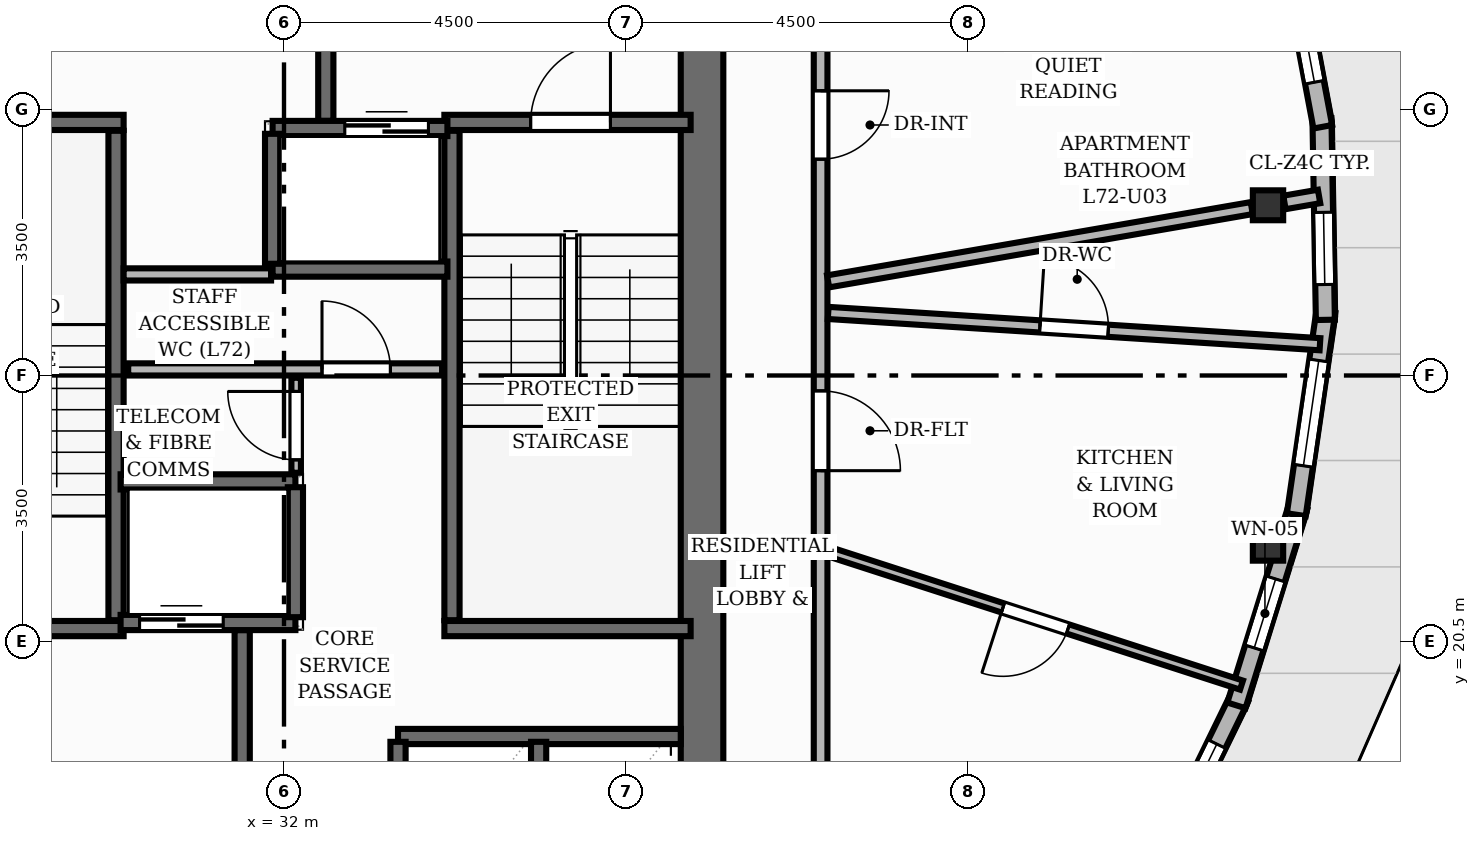
"""IFC4 building model, lengths in metres.
Left out: names, types, materials, properties, quantities, classifications, styles, units other than length and angle.
Written with IfcOpenShell. Run it as: python <this file> out.ifc"""

import sys

from ifc_helpers import new_model, si_unit, direction, frame, frame_2d, origin, origin_2d, place, context, subcontext, project, spatial, rectangle, i_section, extrude, element, fill, save


model = new_model("IFC4")
c1 = context("Model", 3, precision=1e-05, world=origin(), true_north=direction((0.0, 1.0)))
c2 = subcontext(c1, "Body", "Model", "MODEL_VIEW")
j1 = project(units=[si_unit("LENGTHUNIT", "METRE"), si_unit("PLANEANGLEUNIT", "RADIAN")], contexts=[c1])
p1 = place(None, origin())
s1 = spatial("IfcSite", under=j1, at=p1, CompositionType="ELEMENT")
p2 = place(p1, origin())
s2 = spatial("IfcBuilding", under=s1, at=p2, CompositionType="ELEMENT")
p3 = place(p2, frame((0.0, 0.0, 239.84)))
s3 = spatial("IfcBuildingStorey", under=s2, at=p3, CompositionType="ELEMENT", Elevation=239.84)
p4 = place(p3, frame((37.5, 17.28, 0.0), z_axis=(0.0, 0.0, 1.0), x_axis=(0.0, 1.0, 0.0)))
e1 = element("IfcWall", 1, at=p4, inside=s3, PredefinedType="SHEAR", context=c2, shape_type="SweptSolid", body=[
    extrude(rectangle(XDim=13.44, YDim=0.56, at=frame_2d((6.72, 0.0))), origin(), (0.0, 0.0, 1.0), 3.2),
])
for number, where, z_axis, x_axis in (
    (2, (44.946, 26.24, 0.0), (0.0, 0.0, 1.0), (1.0, 0.0, 0.0)),
    (3, (44.946, 21.76, 0.0), (0.0, 0.0, 1.0), (1.0, 0.0, 0.0)),
):
    element("IfcColumn", number, at=place(p3, frame(where, z_axis=z_axis, x_axis=x_axis)), inside=s3, PredefinedType="COLUMN", context=c2, shape_type="SweptSolid", body=[
        extrude(i_section(OverallWidth=0.399, OverallDepth=0.394, WebThickness=0.023, FlangeThickness=0.037, at=origin_2d()), origin(), (0.0, 0.0, 1.0), 3.2),
    ])
p5 = place(p3, frame((44.571, 19.761, 0.0), z_axis=(0.0, 0.0, 1.0), x_axis=(-0.438517804861, -0.898722501565, 0.0)))
e4 = element("IfcWall", 4, at=p5, inside=s3, PredefinedType="SOLIDWALL", context=c2, shape_type="SweptSolid", body=[
    extrude(rectangle(XDim=2.758, YDim=0.25, at=frame_2d((1.379, 0.0))), origin(), (0.0, 0.0, 1.0), 2.88),
])
p6 = place(p5, frame((0.679, 0.0, 0.85)))
e5 = element("IfcOpeningElement", 5, at=p6, cuts=e4, PredefinedType="OPENING", context=c2, shape_type="SweptSolid", body=[
    extrude(rectangle(XDim=1.4, YDim=1.55, at=frame_2d((0.7, 0.775))), frame((0.0, 0.135, 0.0), z_axis=(0.0, -1.0, 0.0), x_axis=(1.0, 0.0, 0.0)), (0.0, 0.0, 1.0), 0.27),
])
p7 = place(p3, frame((45.343, 22.275, 0.0), z_axis=(0.0, 0.0, 1.0), x_axis=(-0.29642164717, -0.955057174775, 0.0)))
e6 = element("IfcWall", 6, at=p7, inside=s3, PredefinedType="SOLIDWALL", context=c2, shape_type="SweptSolid", body=[
    extrude(rectangle(XDim=2.739, YDim=0.25, at=frame_2d((1.369, 0.0))), origin(), (0.0, 0.0, 1.0), 2.497),
])
p8 = place(p7, frame((0.997, 0.0, 0.85)))
e7 = element("IfcOpeningElement", 7, at=p8, cuts=e6, PredefinedType="OPENING", context=c2, shape_type="SweptSolid", body=[
    extrude(rectangle(XDim=0.95, YDim=1.45, at=frame_2d((0.475, 0.725))), frame((0.0, 0.135, 0.0), z_axis=(0.0, -1.0, 0.0), x_axis=(1.0, 0.0, 0.0)), (0.0, 0.0, 1.0), 0.27),
])
p9 = place(p3, frame((45.708, 24.842, 0.0), z_axis=(0.0, 0.0, 1.0), x_axis=(-0.144229466115, -0.989544269401, 0.0)))
e8 = element("IfcWall", 8, at=p9, inside=s3, PredefinedType="SOLIDWALL", context=c2, shape_type="SweptSolid", body=[
    extrude(rectangle(XDim=2.702, YDim=0.25, at=frame_2d((1.351, 0.0))), origin(), (0.0, 0.0, 1.0), 2.497),
])
p10 = place(p9, frame((0.651, 0.0, 0.85)))
e9 = element("IfcOpeningElement", 9, at=p10, cuts=e8, PredefinedType="OPENING", context=c2, shape_type="SweptSolid", body=[
    extrude(rectangle(XDim=1.4, YDim=1.55, at=frame_2d((0.7, 0.775))), frame((0.0, 0.135, 0.0), z_axis=(0.0, -1.0, 0.0), x_axis=(1.0, 0.0, 0.0)), (0.0, 0.0, 1.0), 0.27),
])
p11 = place(p3, frame((45.656, 27.383, 0.0), z_axis=(0.0, 0.0, 1.0), x_axis=(0.016945158089, -0.999856420501, 0.0)))
e10 = element("IfcWall", 10, at=p11, inside=s3, PredefinedType="SOLIDWALL", context=c2, shape_type="SweptSolid", body=[
    extrude(rectangle(XDim=2.651, YDim=0.25, at=frame_2d((1.326, 0.0))), origin(), (0.0, 0.0, 1.0), 2.88),
])
p12 = place(p11, frame((1.236, 0.0, 0.85)))
e11 = element("IfcOpeningElement", 11, at=p12, cuts=e10, PredefinedType="OPENING", context=c2, shape_type="SweptSolid", body=[
    extrude(rectangle(XDim=0.95, YDim=1.44, at=frame_2d((0.475, 0.72))), frame((0.0, 0.135, 0.0), z_axis=(0.0, -1.0, 0.0), x_axis=(1.0, 0.0, 0.0)), (0.0, 0.0, 1.0), 0.27),
])
p13 = place(p3, frame((45.188, 29.82, 0.0), z_axis=(0.0, 0.0, 1.0), x_axis=(0.184783228791, -0.982779302976, 0.0)))
e12 = element("IfcWall", 12, at=p13, inside=s3, PredefinedType="SOLIDWALL", context=c2, shape_type="SweptSolid", body=[
    extrude(rectangle(XDim=2.592, YDim=0.25, at=frame_2d((1.296, 0.0))), origin(), (0.0, 0.0, 1.0), 2.88),
])
p14 = place(p13, frame((0.596, 0.0, 0.85)))
e13 = element("IfcOpeningElement", 13, at=p14, cuts=e12, PredefinedType="OPENING", context=c2, shape_type="SweptSolid", body=[
    extrude(rectangle(XDim=1.4, YDim=1.55, at=frame_2d((0.7, 0.775))), frame((0.0, 0.135, 0.0), z_axis=(0.0, -1.0, 0.0), x_axis=(1.0, 0.0, 0.0)), (0.0, 0.0, 1.0), 0.27),
])
p15 = place(p3, frame((29.79, 20.78, 0.0), z_axis=(0.0, 0.0, 1.0), x_axis=(0.0, 1.0, 0.0)))
e14 = element("IfcWall", 14, at=p15, inside=s3, PredefinedType="SHEAR", context=c2, shape_type="SweptSolid", body=[
    extrude(rectangle(XDim=6.44, YDim=0.2, at=frame_2d((3.22, 0.0))), origin(), (0.0, 0.0, 1.0), 3.2),
])
p16 = place(p3, frame((26.65, 27.33, 0.0), z_axis=(0.0, 0.0, 1.0), x_axis=(1.0, 0.0, 0.0)))
e15 = element("IfcWall", 15, at=p16, inside=s3, PredefinedType="SHEAR", context=c2, shape_type="SweptSolid", body=[
    extrude(rectangle(XDim=3.24, YDim=0.2, at=frame_2d((1.62, 0.0))), origin(), (0.0, 0.0, 1.0), 3.2),
])
p17 = place(p3, frame((26.65, 20.67, 0.0), z_axis=(0.0, 0.0, 1.0), x_axis=(1.0, 0.0, 0.0)))
e16 = element("IfcWall", 16, at=p17, inside=s3, PredefinedType="SHEAR", context=c2, shape_type="SweptSolid", body=[
    extrude(rectangle(XDim=3.24, YDim=0.2, at=frame_2d((1.62, 0.0))), origin(), (0.0, 0.0, 1.0), 3.2),
])
p18 = place(p17, frame((1.055, 0.0, 0.0)))
e17 = element("IfcOpeningElement", 17, at=p18, cuts=e16, PredefinedType="OPENING", context=c2, shape_type="SweptSolid", body=[
    extrude(rectangle(XDim=1.05, YDim=2.15, at=frame_2d((0.525, 1.075))), frame((0.0, 0.11, 0.0), z_axis=(0.0, -1.0, 0.0), x_axis=(1.0, 0.0, 0.0)), (0.0, 0.0, 1.0), 0.22),
])
p19 = place(p3, frame((34.21, 20.78, 0.0), z_axis=(0.0, 0.0, 1.0), x_axis=(0.0, 1.0, 0.0)))
e18 = element("IfcWall", 18, at=p19, inside=s3, PredefinedType="SHEAR", context=c2, shape_type="SweptSolid", body=[
    extrude(rectangle(XDim=6.44, YDim=0.2, at=frame_2d((3.22, 0.0))), origin(), (0.0, 0.0, 1.0), 3.2),
])
p20 = place(p3, frame((34.11, 20.67, 0.0), z_axis=(0.0, 0.0, 1.0), x_axis=(1.0, 0.0, 0.0)))
e19 = element("IfcWall", 19, at=p20, inside=s3, PredefinedType="SHEAR", context=c2, shape_type="SweptSolid", body=[
    extrude(rectangle(XDim=3.24, YDim=0.2, at=frame_2d((1.62, 0.0))), origin(), (0.0, 0.0, 1.0), 3.2),
])
p21 = place(p3, frame((34.11, 27.33, 0.0), z_axis=(0.0, 0.0, 1.0), x_axis=(1.0, 0.0, 0.0)))
e20 = element("IfcWall", 20, at=p21, inside=s3, PredefinedType="SHEAR", context=c2, shape_type="SweptSolid", body=[
    extrude(rectangle(XDim=3.24, YDim=0.2, at=frame_2d((1.62, 0.0))), origin(), (0.0, 0.0, 1.0), 3.2),
])
p22 = place(p21, frame((1.135, 0.0, 0.0)))
e21 = element("IfcOpeningElement", 21, at=p22, cuts=e20, PredefinedType="OPENING", context=c2, shape_type="SweptSolid", body=[
    extrude(rectangle(XDim=1.05, YDim=2.15, at=frame_2d((0.525, 1.075))), frame((0.0, 0.11, 0.0), z_axis=(0.0, -1.0, 0.0), x_axis=(1.0, 0.0, 0.0)), (0.0, 0.0, 1.0), 0.22),
])
for number, where, z_axis, x_axis in (
    (22, (31.45, 17.15, 0.0), (0.0, 0.0, 1.0), (0.0, 1.0, 0.0)),
    (23, (32.55, 27.35, 0.0), (0.0, 0.0, 1.0), (0.0, 1.0, 0.0)),
):
    element("IfcWall", number, at=place(p3, frame(where, z_axis=z_axis, x_axis=x_axis)), inside=s3, PredefinedType="SHEAR", context=c2, shape_type="SweptSolid", body=[
        extrude(rectangle(XDim=3.5, YDim=0.2, at=frame_2d((1.75, 0.0))), origin(), (0.0, 0.0, 1.0), 3.2),
    ])
p23 = place(p3, frame((29.85, 20.75, 0.0), z_axis=(0.0, 0.0, 1.0), x_axis=(1.0, 0.0, 0.0)))
e24 = element("IfcWall", 24, at=p23, inside=s3, PredefinedType="SHEAR", context=c2, shape_type="SweptSolid", body=[
    extrude(rectangle(XDim=2.3, YDim=0.2, at=frame_2d((1.15, 0.0))), origin(), (0.0, 0.0, 1.0), 3.2),
])
p24 = place(p23, frame((0.25, 0.0, 0.0)))
e25 = element("IfcOpeningElement", 25, at=p24, cuts=e24, PredefinedType="OPENING", context=c2, shape_type="SweptSolid", body=[
    extrude(rectangle(XDim=1.1, YDim=2.15, at=frame_2d((0.55, 1.075))), frame((0.0, 0.11, 0.0), z_axis=(0.0, -1.0, 0.0), x_axis=(1.0, 0.0, 0.0)), (0.0, 0.0, 1.0), 0.22),
])
p25 = place(p3, frame((29.85, 22.6, 0.0), z_axis=(0.0, 0.0, 1.0), x_axis=(1.0, 0.0, 0.0)))
e26 = element("IfcWall", 26, at=p25, inside=s3, PredefinedType="SHEAR", context=c2, shape_type="SweptSolid", body=[
    extrude(rectangle(XDim=2.3, YDim=0.2, at=frame_2d((1.15, 0.0))), origin(), (0.0, 0.0, 1.0), 3.2),
])
p26 = place(p3, frame((32.15, 20.82, 0.0), z_axis=(0.0, 0.0, 1.0), x_axis=(0.0, 1.0, 0.0)))
e27 = element("IfcWall", 27, at=p26, inside=s3, PredefinedType="SHEAR", context=c2, shape_type="SweptSolid", body=[
    extrude(rectangle(XDim=1.71, YDim=0.2, at=frame_2d((0.855, 0.0))), origin(), (0.0, 0.0, 1.0), 3.2),
])
p27 = place(p3, frame((31.85, 27.25, 0.0), z_axis=(0.0, 0.0, 1.0), x_axis=(1.0, 0.0, 0.0)))
e28 = element("IfcWall", 28, at=p27, inside=s3, PredefinedType="SHEAR", context=c2, shape_type="SweptSolid", body=[
    extrude(rectangle(XDim=2.3, YDim=0.2, at=frame_2d((1.15, 0.0))), origin(), (0.0, 0.0, 1.0), 3.2),
])
p28 = place(p27, frame((0.95, 0.0, 0.0)))
e29 = element("IfcOpeningElement", 29, at=p28, cuts=e28, PredefinedType="OPENING", context=c2, shape_type="SweptSolid", body=[
    extrude(rectangle(XDim=1.1, YDim=2.15, at=frame_2d((0.55, 1.075))), frame((0.0, 0.11, 0.0), z_axis=(0.0, -1.0, 0.0), x_axis=(1.0, 0.0, 0.0)), (0.0, 0.0, 1.0), 0.22),
])
p29 = place(p3, frame((31.85, 25.4, 0.0), z_axis=(0.0, 0.0, 1.0), x_axis=(1.0, 0.0, 0.0)))
e30 = element("IfcWall", 30, at=p29, inside=s3, PredefinedType="SHEAR", context=c2, shape_type="SweptSolid", body=[
    extrude(rectangle(XDim=2.3, YDim=0.2, at=frame_2d((1.15, 0.0))), origin(), (0.0, 0.0, 1.0), 3.2),
])
p30 = place(p3, frame((31.85, 25.47, 0.0), z_axis=(0.0, 0.0, 1.0), x_axis=(0.0, 1.0, 0.0)))
e31 = element("IfcWall", 31, at=p30, inside=s3, PredefinedType="SHEAR", context=c2, shape_type="SweptSolid", body=[
    extrude(rectangle(XDim=1.71, YDim=0.2, at=frame_2d((0.855, 0.0))), origin(), (0.0, 0.0, 1.0), 3.2),
])
p31 = place(p3, frame((33.5, 19.25, 0.0), z_axis=(0.0, 0.0, 1.0), x_axis=(1.0, 0.0, 0.0)))
e32 = element("IfcWall", 32, at=p31, inside=s3, PredefinedType="SHEAR", context=c2, shape_type="SweptSolid", body=[
    extrude(rectangle(XDim=3.72, YDim=0.2, at=frame_2d((1.86, 0.0))), origin(), (0.0, 0.0, 1.0), 3.2),
])
for number, where, z_axis, x_axis in (
    (33, (33.5, 17.32, 0.0), (0.0, 0.0, 1.0), (0.0, 1.0, 0.0)),
    (34, (35.35, 17.32, 0.0), (0.0, 0.0, 1.0), (0.0, 1.0, 0.0)),
):
    element("IfcWall", number, at=place(p3, frame(where, z_axis=z_axis, x_axis=x_axis)), inside=s3, PredefinedType="SHEAR", context=c2, shape_type="SweptSolid", body=[
        extrude(rectangle(XDim=1.86, YDim=0.2, at=frame_2d((0.93, 0.0))), origin(), (0.0, 0.0, 1.0), 3.2),
    ])
p32 = place(p3, frame((29.95, 24.08, 0.0), z_axis=(0.0, 0.0, 1.0), x_axis=(1.0, 0.0, 0.0)))
e35 = element("IfcWall", 35, at=p32, inside=s3, PredefinedType="PLUMBINGWALL", context=c2, shape_type="SweptSolid", body=[
    extrude(rectangle(XDim=4.13, YDim=0.16, at=frame_2d((2.065, 0.0))), origin(), (0.0, 0.0, 1.0), 2.875),
])
p33 = place(p32, frame((2.55, 0.0, 0.0)))
e36 = element("IfcOpeningElement", 36, at=p33, cuts=e35, PredefinedType="OPENING", context=c2, shape_type="SweptSolid", body=[
    extrude(rectangle(XDim=0.9, YDim=2.1, at=frame_2d((0.45, 1.05))), frame((0.0, 0.09, 0.0), z_axis=(0.0, -1.0, 0.0), x_axis=(1.0, 0.0, 0.0)), (0.0, 0.0, 1.0), 0.18),
])
p34 = place(p3, frame((32.16, 22.72, 0.0), z_axis=(0.0, 0.0, 1.0), x_axis=(0.0, 1.0, 0.0)))
e37 = element("IfcWall", 37, at=p34, inside=s3, PredefinedType="PARTITIONING", context=c2, shape_type="SweptSolid", body=[
    extrude(rectangle(XDim=1.25, YDim=0.125, at=frame_2d((0.625, 0.0))), origin(), (0.0, 0.0, 1.0), 2.875),
])
p35 = place(p34, frame((0.17, 0.0, 0.0)))
e38 = element("IfcOpeningElement", 38, at=p35, cuts=e37, PredefinedType="OPENING", context=c2, shape_type="SweptSolid", body=[
    extrude(rectangle(XDim=0.9, YDim=2.1, at=frame_2d((0.45, 1.05))), frame((0.0, 0.073, 0.0), z_axis=(0.0, -1.0, 0.0), x_axis=(1.0, 0.0, 0.0)), (0.0, 0.0, 1.0), 0.145),
])
p36 = place(p3, frame((29.89, 25.33, 0.0), z_axis=(0.0, 0.0, 1.0), x_axis=(1.0, 0.0, 0.0)))
e39 = element("IfcWall", 39, at=p36, inside=s3, PredefinedType="PLUMBINGWALL", context=c2, shape_type="SweptSolid", body=[
    extrude(rectangle(XDim=1.94, YDim=0.16, at=frame_2d((0.97, 0.0))), origin(), (0.0, 0.0, 1.0), 2.875),
])
p37 = place(p3, frame((45.163, 26.277, 0.0), z_axis=(0.0, 0.0, 1.0), x_axis=(0.985450971837, 0.169959942652, 0.0)))
e40 = element("IfcWall", 40, at=p37, inside=s3, PredefinedType="PARTITIONING", context=c2, shape_type="SweptSolid", body=[
    extrude(rectangle(XDim=0.463, YDim=0.18, at=frame_2d((0.231, 0.0))), origin(), (0.0, 0.0, 1.0), 2.323),
])
p38 = place(p3, frame((39.06, 29.391, 0.0), z_axis=(0.0, 0.0, 1.0), x_axis=(0.0, -1.0, 0.0)))
e41 = element("IfcWall", 41, at=p38, inside=s3, PredefinedType="PARTITIONING", context=c2, shape_type="SweptSolid", body=[
    extrude(rectangle(XDim=13.951, YDim=0.18, at=frame_2d((6.975, 0.0))), origin(), (0.0, 0.0, 1.0), 2.875),
])
p39 = place(p38, frame((5.593, 0.0, 0.0)))
e42 = element("IfcOpeningElement", 42, at=p39, cuts=e41, PredefinedType="OPENING", context=c2, shape_type="SweptSolid", body=[
    extrude(rectangle(XDim=1.05, YDim=2.15, at=frame_2d((0.525, 1.075))), frame((0.0, 0.1, 0.0), z_axis=(0.0, -1.0, 0.0), x_axis=(1.0, 0.0, 0.0)), (0.0, 0.0, 1.0), 0.2),
])
p40 = place(p38, frame((1.645, 0.0, 0.0)))
e43 = element("IfcOpeningElement", 43, at=p40, cuts=e41, PredefinedType="OPENING", context=c2, shape_type="SweptSolid", body=[
    extrude(rectangle(XDim=0.9, YDim=2.1, at=frame_2d((0.45, 1.05))), frame((0.0, 0.1, 0.0), z_axis=(0.0, -1.0, 0.0), x_axis=(1.0, 0.0, 0.0)), (0.0, 0.0, 1.0), 0.2),
])
p41 = place(p3, frame((39.16, 24.823, 0.0), z_axis=(0.0, 0.0, 1.0), x_axis=(0.997982507088, -0.063489491621, 0.0)))
e44 = element("IfcWall", 44, at=p41, inside=s3, PredefinedType="PLUMBINGWALL", context=c2, shape_type="SweptSolid", body=[
    extrude(rectangle(XDim=6.483, YDim=0.16, at=frame_2d((3.242, 0.0))), origin(), (0.0, 0.0, 1.0), 2.612),
])
p42 = place(p41, frame((2.792, 0.0, 0.0)))
e45 = element("IfcOpeningElement", 45, at=p42, cuts=e44, PredefinedType="OPENING", context=c2, shape_type="SweptSolid", body=[
    extrude(rectangle(XDim=0.9, YDim=2.1, at=frame_2d((0.45, 1.05))), frame((0.0, 0.09, 0.0), z_axis=(0.0, -1.0, 0.0), x_axis=(1.0, 0.0, 0.0)), (0.0, 0.0, 1.0), 0.18),
])
p43 = place(p3, frame((44.598, 19.926, 0.0), z_axis=(0.0, 0.0, 1.0), x_axis=(-0.951480669713, 0.307708523058, 0.0)))
e46 = element("IfcWall", 46, at=p43, inside=s3, PredefinedType="PARTITIONING", context=c2, shape_type="SweptSolid", body=[
    extrude(rectangle(XDim=5.7, YDim=0.125, at=frame_2d((2.85, 0.0))), origin(), (0.0, 0.0, 1.0), 2.612),
])
p44 = place(p43, frame((2.4, 0.0, 0.0)))
e47 = element("IfcOpeningElement", 47, at=p44, cuts=e46, PredefinedType="OPENING", context=c2, shape_type="SweptSolid", body=[
    extrude(rectangle(XDim=0.9, YDim=2.1, at=frame_2d((0.45, 1.05))), frame((0.0, 0.073, 0.0), z_axis=(0.0, -1.0, 0.0), x_axis=(1.0, 0.0, 0.0)), (0.0, 0.0, 1.0), 0.145),
])
p45 = place(p3, frame((39.158, 25.238, 0.0), z_axis=(0.0, 0.0, 1.0), x_axis=(0.985360267717, 0.170485022229, 0.0)))
e48 = element("IfcWall", 48, at=p45, inside=s3, PredefinedType="PLUMBINGWALL", context=c2, shape_type="SweptSolid", body=[
    extrude(rectangle(XDim=5.656, YDim=0.16, at=frame_2d((2.828, 0.0))), origin(), (0.0, 0.0, 1.0), 2.323),
])
p46 = place(p6, origin())
e49 = element("IfcWindow", 49, at=p46, inside=s3, PartitioningType="SINGLE_PANEL", PredefinedType="WINDOW", context=c2, shape_type="SweptSolid", body=[
    extrude(rectangle(XDim=1.4, YDim=1.55, at=frame_2d((0.7, 0.775))), frame((0.0, 0.03, 0.0), z_axis=(0.0, -1.0, 0.0), x_axis=(1.0, 0.0, 0.0)), (0.0, 0.0, 1.0), 0.06),
])
fill(e5, e49)
p47 = place(p8, origin())
e50 = element("IfcWindow", 50, at=p47, inside=s3, PartitioningType="SINGLE_PANEL", PredefinedType="WINDOW", context=c2, shape_type="SweptSolid", body=[
    extrude(rectangle(XDim=0.95, YDim=1.45, at=frame_2d((0.475, 0.725))), frame((0.0, 0.03, 0.0), z_axis=(0.0, -1.0, 0.0), x_axis=(1.0, 0.0, 0.0)), (0.0, 0.0, 1.0), 0.06),
])
fill(e7, e50)
p48 = place(p10, origin())
e51 = element("IfcWindow", 51, at=p48, inside=s3, PartitioningType="SINGLE_PANEL", PredefinedType="WINDOW", context=c2, shape_type="SweptSolid", body=[
    extrude(rectangle(XDim=1.4, YDim=1.55, at=frame_2d((0.7, 0.775))), frame((0.0, 0.03, 0.0), z_axis=(0.0, -1.0, 0.0), x_axis=(1.0, 0.0, 0.0)), (0.0, 0.0, 1.0), 0.06),
])
fill(e9, e51)
p49 = place(p12, origin())
e52 = element("IfcWindow", 52, at=p49, inside=s3, PartitioningType="SINGLE_PANEL", PredefinedType="WINDOW", context=c2, shape_type="SweptSolid", body=[
    extrude(rectangle(XDim=0.95, YDim=1.44, at=frame_2d((0.475, 0.72))), frame((0.0, 0.03, 0.0), z_axis=(0.0, -1.0, 0.0), x_axis=(1.0, 0.0, 0.0)), (0.0, 0.0, 1.0), 0.06),
])
fill(e11, e52)
p50 = place(p14, origin())
e53 = element("IfcWindow", 53, at=p50, inside=s3, PartitioningType="SINGLE_PANEL", PredefinedType="WINDOW", context=c2, shape_type="SweptSolid", body=[
    extrude(rectangle(XDim=1.4, YDim=1.55, at=frame_2d((0.7, 0.775))), frame((0.0, 0.03, 0.0), z_axis=(0.0, -1.0, 0.0), x_axis=(1.0, 0.0, 0.0)), (0.0, 0.0, 1.0), 0.06),
])
fill(e13, e53)
p51 = place(p22, origin())
e54 = element("IfcDoor", 54, at=p51, inside=s3, OperationType="SINGLE_SWING_RIGHT", PredefinedType="DOOR", context=c2, shape_type="SweptSolid", body=[
    extrude(rectangle(XDim=1.05, YDim=2.15, at=frame_2d((0.525, 1.075))), frame((0.0, 0.025, 0.0), z_axis=(0.0, -1.0, 0.0), x_axis=(1.0, 0.0, 0.0)), (0.0, 0.0, 1.0), 0.05),
])
fill(e21, e54)
p52 = place(p24, origin())
e55 = element("IfcDoor", 55, at=p52, inside=s3, OperationType="DOUBLE_DOOR_SLIDING", PredefinedType="DOOR", context=c2, shape_type="SweptSolid", body=[
    extrude(rectangle(XDim=1.1, YDim=2.15, at=frame_2d((0.55, 1.075))), frame((0.0, 0.025, 0.0), z_axis=(0.0, -1.0, 0.0), x_axis=(1.0, 0.0, 0.0)), (0.0, 0.0, 1.0), 0.05),
])
fill(e25, e55)
p53 = place(p28, origin())
e56 = element("IfcDoor", 56, at=p53, inside=s3, OperationType="DOUBLE_DOOR_SLIDING", PredefinedType="DOOR", context=c2, shape_type="SweptSolid", body=[
    extrude(rectangle(XDim=1.1, YDim=2.15, at=frame_2d((0.55, 1.075))), frame((0.0, 0.025, 0.0), z_axis=(0.0, -1.0, 0.0), x_axis=(1.0, 0.0, 0.0)), (0.0, 0.0, 1.0), 0.05),
])
fill(e29, e56)
p54 = place(p33, origin())
e57 = element("IfcDoor", 57, at=p54, inside=s3, OperationType="SINGLE_SWING_LEFT", PredefinedType="DOOR", context=c2, shape_type="SweptSolid", body=[
    extrude(rectangle(XDim=0.9, YDim=2.1, at=frame_2d((0.45, 1.05))), frame((0.0, 0.025, 0.0), z_axis=(0.0, -1.0, 0.0), x_axis=(1.0, 0.0, 0.0)), (0.0, 0.0, 1.0), 0.05),
])
fill(e36, e57)
p55 = place(p35, origin())
e58 = element("IfcDoor", 58, at=p55, inside=s3, OperationType="SINGLE_SWING_RIGHT", PredefinedType="DOOR", context=c2, shape_type="SweptSolid", body=[
    extrude(rectangle(XDim=0.9, YDim=2.1, at=frame_2d((0.45, 1.05))), frame((0.0, 0.025, 0.0), z_axis=(0.0, -1.0, 0.0), x_axis=(1.0, 0.0, 0.0)), (0.0, 0.0, 1.0), 0.05),
])
fill(e38, e58)
p56 = place(p39, origin())
e59 = element("IfcDoor", 59, at=p56, inside=s3, OperationType="SINGLE_SWING_RIGHT", PredefinedType="DOOR", context=c2, shape_type="SweptSolid", body=[
    extrude(rectangle(XDim=1.05, YDim=2.15, at=frame_2d((0.525, 1.075))), frame((0.0, 0.025, 0.0), z_axis=(0.0, -1.0, 0.0), x_axis=(1.0, 0.0, 0.0)), (0.0, 0.0, 1.0), 0.05),
])
fill(e42, e59)
p57 = place(p42, origin())
e60 = element("IfcDoor", 60, at=p57, inside=s3, OperationType="SINGLE_SWING_LEFT", PredefinedType="DOOR", context=c2, shape_type="SweptSolid", body=[
    extrude(rectangle(XDim=0.9, YDim=2.1, at=frame_2d((0.45, 1.05))), frame((0.0, 0.025, 0.0), z_axis=(0.0, -1.0, 0.0), x_axis=(1.0, 0.0, 0.0)), (0.0, 0.0, 1.0), 0.05),
])
fill(e45, e60)
p58 = place(p44, origin())
e61 = element("IfcDoor", 61, at=p58, inside=s3, OperationType="SINGLE_SWING_RIGHT", PredefinedType="DOOR", context=c2, shape_type="SweptSolid", body=[
    extrude(rectangle(XDim=0.9, YDim=2.1, at=frame_2d((0.45, 1.05))), frame((0.0, 0.025, 0.0), z_axis=(0.0, -1.0, 0.0), x_axis=(1.0, 0.0, 0.0)), (0.0, 0.0, 1.0), 0.05),
])
fill(e47, e61)
p59 = place(p40, origin())
e62 = element("IfcDoor", 62, at=p59, inside=s3, OperationType="SINGLE_SWING_LEFT", PredefinedType="DOOR", context=c2, shape_type="SweptSolid", body=[
    extrude(rectangle(XDim=0.9, YDim=2.1, at=frame_2d((0.45, 1.05))), frame((0.0, 0.025, 0.0), z_axis=(0.0, -1.0, 0.0), x_axis=(1.0, 0.0, 0.0)), (0.0, 0.0, 1.0), 0.05),
])
fill(e43, e62)
save(model, sys.argv[1])
